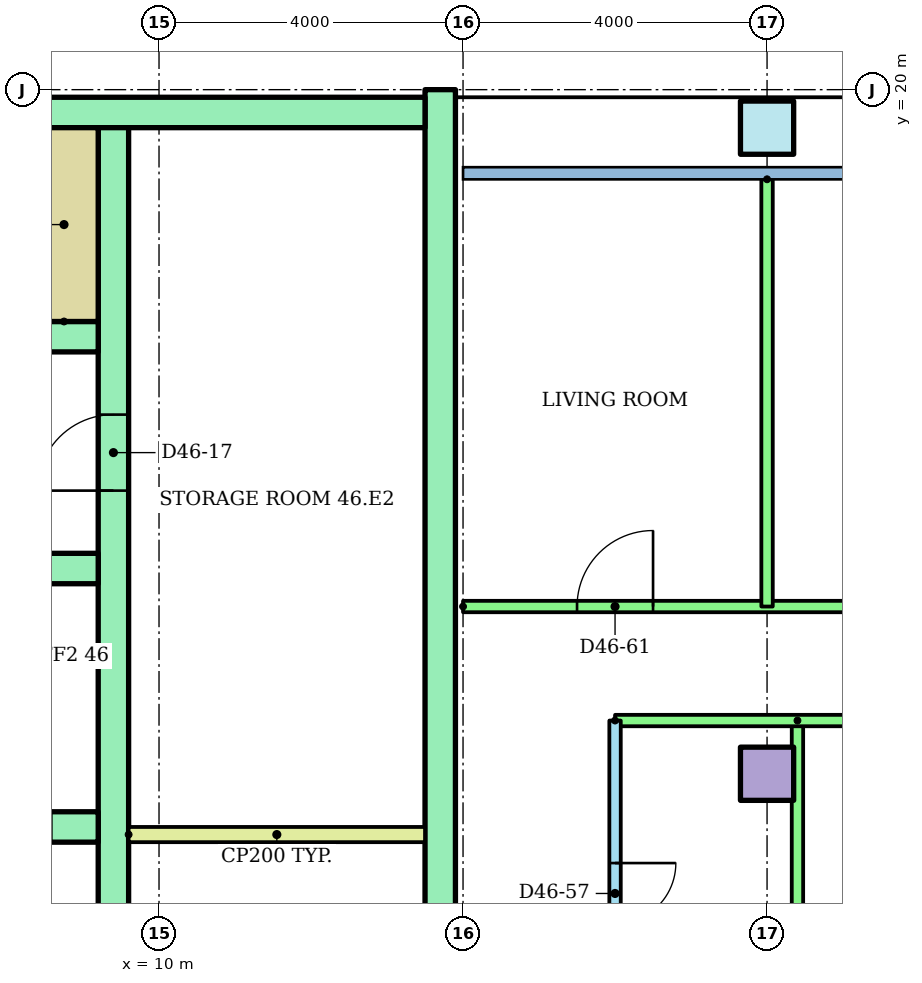
"""IFC4 building model, lengths in metres.
Left out: names, types, materials, properties, quantities, classifications, styles, units other than length and angle.
Written with IfcOpenShell. Run it as: python <this file> out.ifc"""

import sys

from ifc_helpers import new_model, si_unit, direction, frame, frame_2d, origin, origin_2d, place, context, subcontext, project, spatial, rectangle, hollow_rectangle, extrude, element, fill, save


model = new_model("IFC4")
c1 = context("Model", 3, precision=1e-05, world=origin(), true_north=direction((0.0, 1.0)))
c2 = subcontext(c1, "Body", "Model", "MODEL_VIEW")
j1 = project(units=[si_unit("LENGTHUNIT", "METRE"), si_unit("PLANEANGLEUNIT", "RADIAN")], contexts=[c1])
p1 = place(None, origin())
s1 = spatial("IfcSite", under=j1, at=p1, CompositionType="ELEMENT")
p2 = place(p1, origin())
s2 = spatial("IfcBuilding", under=s1, at=p2, CompositionType="ELEMENT")
p3 = place(p2, frame((0.0, 0.0, 178.1)))
s3 = spatial("IfcBuildingStorey", under=s2, at=p3, CompositionType="ELEMENT", Elevation=178.1)
p4 = place(p3, frame((18.0, 11.0, 0.0)))
e1 = element("IfcColumn", 1, at=p4, inside=s3, PredefinedType="COLUMN", context=c2, shape_type="SweptSolid", body=[
    extrude(rectangle(XDim=0.7, YDim=0.7, at=origin_2d()), origin(), (0.0, 0.0, 1.0), 3.2),
])
p5 = place(p3, frame((18.0, 19.5, 0.0)))
e2 = element("IfcColumn", 2, at=p5, inside=s3, PredefinedType="COLUMN", context=c2, shape_type="SweptSolid", body=[
    extrude(hollow_rectangle(XDim=0.7, YDim=0.7, WallThickness=0.036, at=origin_2d()), origin(), (0.0, 0.0, 1.0), 3.2),
])
p6 = place(p3, frame((13.7, 3.0, 0.0), z_axis=(0.0, 0.0, 1.0), x_axis=(0.0, 1.0, 0.0)))
e3 = element("IfcWall", 3, at=p6, inside=s3, PredefinedType="SHEAR", context=c2, shape_type="SweptSolid", body=[
    extrude(rectangle(XDim=17.0, YDim=0.4, at=frame_2d((8.5, 0.0))), origin(), (0.0, 0.0, 1.0), 2.92),
])
p7 = place(p3, frame((-13.5, 19.7, 0.0)))
e4 = element("IfcWall", 4, at=p7, inside=s3, PredefinedType="SHEAR", context=c2, shape_type="SweptSolid", body=[
    extrude(rectangle(XDim=27.0, YDim=0.4, at=frame_2d((13.5, 0.0))), origin(), (0.0, 0.0, 1.0), 2.92),
])
p8 = place(p3, frame((9.4, 6.8, 0.0), z_axis=(0.0, 0.0, 1.0), x_axis=(0.0, 1.0, 0.0)))
e5 = element("IfcWall", 5, at=p8, inside=s3, PredefinedType="SHEAR", context=c2, shape_type="SweptSolid", body=[
    extrude(rectangle(XDim=12.7, YDim=0.4, at=frame_2d((6.35, 0.0))), origin(), (0.0, 0.0, 1.0), 2.92),
])
p9 = place(p8, frame((1.15, 0.0, 0.0)))
e6 = element("IfcOpeningElement", 6, at=p9, cuts=e5, PredefinedType="OPENING", context=c2, shape_type="SweptSolid", body=[
    extrude(rectangle(XDim=1.0, YDim=2.1, at=frame_2d((0.5, 1.05))), frame((0.0, 0.21, 0.0), z_axis=(0.0, -1.0, 0.0), x_axis=(1.0, 0.0, 0.0)), (0.0, 0.0, 1.0), 0.42),
])
p10 = place(p8, frame((7.925, 0.0, 0.0)))
e7 = element("IfcOpeningElement", 7, at=p10, cuts=e5, PredefinedType="OPENING", context=c2, shape_type="SweptSolid", body=[
    extrude(rectangle(XDim=1.0, YDim=2.1, at=frame_2d((0.5, 1.05))), frame((0.0, 0.21, 0.0), z_axis=(0.0, -1.0, 0.0), x_axis=(1.0, 0.0, 0.0)), (0.0, 0.0, 1.0), 0.42),
])
p11 = place(p3, frame((1.2, 10.3, 0.0)))
e8 = element("IfcWall", 8, at=p11, inside=s3, PredefinedType="SHEAR", context=c2, shape_type="SweptSolid", body=[
    extrude(rectangle(XDim=8.0, YDim=0.4, at=frame_2d((4.0, 0.0))), origin(), (0.0, 0.0, 1.0), 2.92),
])
p12 = place(p11, frame((3.55, 0.0, 0.0)))
e9 = element("IfcOpeningElement", 9, at=p12, cuts=e8, PredefinedType="OPENING", context=c2, shape_type="SweptSolid", body=[
    extrude(rectangle(XDim=1.1, YDim=2.1, at=frame_2d((0.55, 1.05))), frame((0.0, 0.21, 0.0), z_axis=(0.0, -1.0, 0.0), x_axis=(1.0, 0.0, 0.0)), (0.0, 0.0, 1.0), 0.42),
])
p13 = place(p11, frame((6.283, 0.0, 0.0)))
e10 = element("IfcOpeningElement", 10, at=p13, cuts=e8, PredefinedType="OPENING", context=c2, shape_type="SweptSolid", body=[
    extrude(rectangle(XDim=1.1, YDim=2.1, at=frame_2d((0.55, 1.05))), frame((0.0, 0.21, 0.0), z_axis=(0.0, -1.0, 0.0), x_axis=(1.0, 0.0, 0.0)), (0.0, 0.0, 1.0), 0.42),
])
p14 = place(p11, frame((0.867, 0.0, 0.0)))
e11 = element("IfcOpeningElement", 11, at=p14, cuts=e8, PredefinedType="OPENING", context=c2, shape_type="SweptSolid", body=[
    extrude(rectangle(XDim=1.0, YDim=2.1, at=frame_2d((0.5, 1.05))), frame((0.0, 0.21, 0.0), z_axis=(0.0, -1.0, 0.0), x_axis=(1.0, 0.0, 0.0)), (0.0, 0.0, 1.0), 0.42),
])
p15 = place(p3, frame((1.2, 13.7, 0.0)))
e12 = element("IfcWall", 12, at=p15, inside=s3, PredefinedType="SHEAR", context=c2, shape_type="SweptSolid", body=[
    extrude(rectangle(XDim=8.0, YDim=0.4, at=frame_2d((4.0, 0.0))), origin(), (0.0, 0.0, 1.0), 2.92),
])
p16 = place(p3, frame((-9.2, 16.75, 0.0)))
e13 = element("IfcWall", 13, at=p16, inside=s3, PredefinedType="SHEAR", context=c2, shape_type="SweptSolid", body=[
    extrude(rectangle(XDim=18.4, YDim=0.4, at=frame_2d((9.2, 0.0))), origin(), (0.0, 0.0, 1.0), 2.92),
])
p17 = place(p16, frame((0.1, 0.0, 0.0)))
e14 = element("IfcOpeningElement", 14, at=p17, cuts=e13, PredefinedType="OPENING", context=c2, shape_type="SweptSolid", body=[
    extrude(rectangle(XDim=0.95, YDim=2.1, at=frame_2d((0.475, 1.05))), frame((0.0, 0.21, 0.0), z_axis=(0.0, -1.0, 0.0), x_axis=(1.0, 0.0, 0.0)), (0.0, 0.0, 1.0), 0.42),
])
p18 = place(p16, frame((6.1, 0.0, 0.0)))
e15 = element("IfcOpeningElement", 15, at=p18, cuts=e13, PredefinedType="OPENING", context=c2, shape_type="SweptSolid", body=[
    extrude(rectangle(XDim=0.95, YDim=2.1, at=frame_2d((0.475, 1.05))), frame((0.0, 0.21, 0.0), z_axis=(0.0, -1.0, 0.0), x_axis=(1.0, 0.0, 0.0)), (0.0, 0.0, 1.0), 0.42),
])
p19 = place(p16, frame((12.1, 0.0, 0.0)))
e16 = element("IfcOpeningElement", 16, at=p19, cuts=e13, PredefinedType="OPENING", context=c2, shape_type="SweptSolid", body=[
    extrude(rectangle(XDim=0.95, YDim=2.1, at=frame_2d((0.475, 1.05))), frame((0.0, 0.21, 0.0), z_axis=(0.0, -1.0, 0.0), x_axis=(1.0, 0.0, 0.0)), (0.0, 0.0, 1.0), 0.42),
])
p20 = place(p3, frame((8.75, 16.95, 0.0), z_axis=(0.0, 0.0, 1.0), x_axis=(0.0, 1.0, 0.0)))
e17 = element("IfcWall", 17, at=p20, inside=s3, PredefinedType="SHEAR", context=c2, shape_type="SweptSolid", body=[
    extrude(rectangle(XDim=2.55, YDim=0.9, at=frame_2d((1.275, 0.0))), origin(), (0.0, 0.0, 1.0), 2.92),
])
p21 = place(p3, frame((9.6, 10.2, 0.0)))
e18 = element("IfcWall", 18, at=p21, inside=s3, PredefinedType="PARTITIONING", context=c2, shape_type="SweptSolid", body=[
    extrude(rectangle(XDim=3.9, YDim=0.2, at=frame_2d((1.95, 0.0))), origin(), (0.0, 0.0, 1.0), 2.92),
])
p22 = place(p3, frame((16.0, 11.7, 0.0), z_axis=(0.0, 0.0, 1.0), x_axis=(0.0, -1.0, 0.0)))
e19 = element("IfcWall", 19, at=p22, inside=s3, PredefinedType="PARTITIONING", context=c2, shape_type="SweptSolid", body=[
    extrude(rectangle(XDim=10.3, YDim=0.15, at=frame_2d((5.15, 0.0))), origin(), (0.0, 0.0, 1.0), 2.4),
])
p23 = place(p22, frame((6.975, 0.0, 0.0)))
e20 = element("IfcOpeningElement", 20, at=p23, cuts=e19, PredefinedType="OPENING", context=c2, shape_type="SweptSolid", body=[
    extrude(rectangle(XDim=0.9, YDim=2.1, at=frame_2d((0.45, 1.05))), frame((0.0, 0.085, 0.0), z_axis=(0.0, -1.0, 0.0), x_axis=(1.0, 0.0, 0.0)), (0.0, 0.0, 1.0), 0.17),
])
p24 = place(p22, frame((1.875, 0.0, 0.0)))
e21 = element("IfcOpeningElement", 21, at=p24, cuts=e19, PredefinedType="OPENING", context=c2, shape_type="SweptSolid", body=[
    extrude(rectangle(XDim=0.8, YDim=2.1, at=frame_2d((0.4, 1.05))), frame((0.0, 0.085, 0.0), z_axis=(0.0, -1.0, 0.0), x_axis=(1.0, 0.0, 0.0)), (0.0, 0.0, 1.0), 0.17),
])
p25 = place(p3, frame((18.4, 11.7, 0.0), z_axis=(0.0, 0.0, 1.0), x_axis=(0.0, -1.0, 0.0)))
e22 = element("IfcWall", 22, at=p25, inside=s3, PredefinedType="PARTITIONING", context=c2, shape_type="SweptSolid", body=[
    extrude(rectangle(XDim=10.3, YDim=0.15, at=frame_2d((5.15, 0.0))), origin(), (0.0, 0.0, 1.0), 2.4),
])
p26 = place(p3, frame((36.82, 11.7, 0.0), z_axis=(0.0, 0.0, 1.0), x_axis=(-1.0, 0.0, 0.0)))
e23 = element("IfcWall", 23, at=p26, inside=s3, PredefinedType="PARTITIONING", context=c2, shape_type="SweptSolid", body=[
    extrude(rectangle(XDim=20.82, YDim=0.15, at=frame_2d((10.41, 0.0))), origin(), (0.0, 0.0, 1.0), 2.4),
])
p27 = place(p26, frame((14.095, 0.0, 0.0)))
e24 = element("IfcOpeningElement", 24, at=p27, cuts=e23, PredefinedType="OPENING", context=c2, shape_type="SweptSolid", body=[
    extrude(rectangle(XDim=0.9, YDim=2.1, at=frame_2d((0.45, 1.05))), frame((0.0, 0.085, 0.0), z_axis=(0.0, -1.0, 0.0), x_axis=(1.0, 0.0, 0.0)), (0.0, 0.0, 1.0), 0.17),
])
p28 = place(p26, frame((7.22, 0.0, 0.0)))
e25 = element("IfcOpeningElement", 25, at=p28, cuts=e23, PredefinedType="OPENING", context=c2, shape_type="SweptSolid", body=[
    extrude(rectangle(XDim=0.9, YDim=2.1, at=frame_2d((0.45, 1.05))), frame((0.0, 0.085, 0.0), z_axis=(0.0, -1.0, 0.0), x_axis=(1.0, 0.0, 0.0)), (0.0, 0.0, 1.0), 0.17),
])
p29 = place(p26, frame((1.373, 0.0, 0.0)))
e26 = element("IfcOpeningElement", 26, at=p29, cuts=e23, PredefinedType="OPENING", context=c2, shape_type="SweptSolid", body=[
    extrude(rectangle(XDim=0.9, YDim=2.1, at=frame_2d((0.45, 1.05))), frame((0.0, 0.085, 0.0), z_axis=(0.0, -1.0, 0.0), x_axis=(1.0, 0.0, 0.0)), (0.0, 0.0, 1.0), 0.17),
])
p30 = place(p3, frame((14.0, 13.2, 0.0)))
e27 = element("IfcWall", 27, at=p30, inside=s3, PredefinedType="PARTITIONING", context=c2, shape_type="SweptSolid", body=[
    extrude(rectangle(XDim=22.82, YDim=0.15, at=frame_2d((11.41, 0.0))), origin(), (0.0, 0.0, 1.0), 2.4),
])
p31 = place(p30, frame((1.5, 0.0, 0.0)))
e28 = element("IfcOpeningElement", 28, at=p31, cuts=e27, PredefinedType="OPENING", context=c2, shape_type="SweptSolid", body=[
    extrude(rectangle(XDim=1.0, YDim=2.1, at=frame_2d((0.5, 1.05))), frame((0.0, 0.085, 0.0), z_axis=(0.0, -1.0, 0.0), x_axis=(1.0, 0.0, 0.0)), (0.0, 0.0, 1.0), 0.17),
])
p32 = place(p30, frame((7.55, 0.0, 0.0)))
e29 = element("IfcOpeningElement", 29, at=p32, cuts=e27, PredefinedType="OPENING", context=c2, shape_type="SweptSolid", body=[
    extrude(rectangle(XDim=0.9, YDim=2.1, at=frame_2d((0.45, 1.05))), frame((0.0, 0.085, 0.0), z_axis=(0.0, -1.0, 0.0), x_axis=(1.0, 0.0, 0.0)), (0.0, 0.0, 1.0), 0.17),
])
p33 = place(p30, frame((14.6, 0.0, 0.0)))
e30 = element("IfcOpeningElement", 30, at=p33, cuts=e27, PredefinedType="OPENING", context=c2, shape_type="SweptSolid", body=[
    extrude(rectangle(XDim=0.9, YDim=2.1, at=frame_2d((0.45, 1.05))), frame((0.0, 0.085, 0.0), z_axis=(0.0, -1.0, 0.0), x_axis=(1.0, 0.0, 0.0)), (0.0, 0.0, 1.0), 0.17),
])
p34 = place(p30, frame((19.9, 0.0, 0.0)))
e31 = element("IfcOpeningElement", 31, at=p34, cuts=e27, PredefinedType="OPENING", context=c2, shape_type="SweptSolid", body=[
    extrude(rectangle(XDim=0.9, YDim=2.1, at=frame_2d((0.45, 1.05))), frame((0.0, 0.085, 0.0), z_axis=(0.0, -1.0, 0.0), x_axis=(1.0, 0.0, 0.0)), (0.0, 0.0, 1.0), 0.17),
])
p35 = place(p3, frame((18.0, 18.821, 0.0), z_axis=(0.0, 0.0, 1.0), x_axis=(0.0, -1.0, 0.0)))
e32 = element("IfcWall", 32, at=p35, inside=s3, PredefinedType="PARTITIONING", context=c2, shape_type="SweptSolid", body=[
    extrude(rectangle(XDim=5.621, YDim=0.15, at=frame_2d((2.811, 0.0))), origin(), (0.0, 0.0, 1.0), 2.4),
])
p36 = place(p10, origin())
e33 = element("IfcDoor", 33, at=p36, inside=s3, OperationType="SINGLE_SWING_LEFT", PredefinedType="DOOR", context=c2, shape_type="SweptSolid", body=[
    extrude(rectangle(XDim=1.0, YDim=2.1, at=frame_2d((0.5, 1.05))), frame((0.0, 0.025, 0.0), z_axis=(0.0, -1.0, 0.0), x_axis=(1.0, 0.0, 0.0)), (0.0, 0.0, 1.0), 0.05),
])
fill(e7, e33)
p37 = place(p24, origin())
e34 = element("IfcDoor", 34, at=p37, inside=s3, OperationType="SINGLE_SWING_LEFT", PredefinedType="DOOR", context=c2, shape_type="SweptSolid", body=[
    extrude(rectangle(XDim=0.8, YDim=2.1, at=frame_2d((0.4, 1.05))), frame((0.0, 0.025, 0.0), z_axis=(0.0, -1.0, 0.0), x_axis=(1.0, 0.0, 0.0)), (0.0, 0.0, 1.0), 0.05),
])
fill(e21, e34)
p38 = place(p31, origin())
e35 = element("IfcDoor", 35, at=p38, inside=s3, OperationType="SINGLE_SWING_RIGHT", PredefinedType="DOOR", context=c2, shape_type="SweptSolid", body=[
    extrude(rectangle(XDim=1.0, YDim=2.1, at=frame_2d((0.5, 1.05))), frame((0.0, 0.025, 0.0), z_axis=(0.0, -1.0, 0.0), x_axis=(1.0, 0.0, 0.0)), (0.0, 0.0, 1.0), 0.05),
])
fill(e28, e35)
save(model, sys.argv[1])
